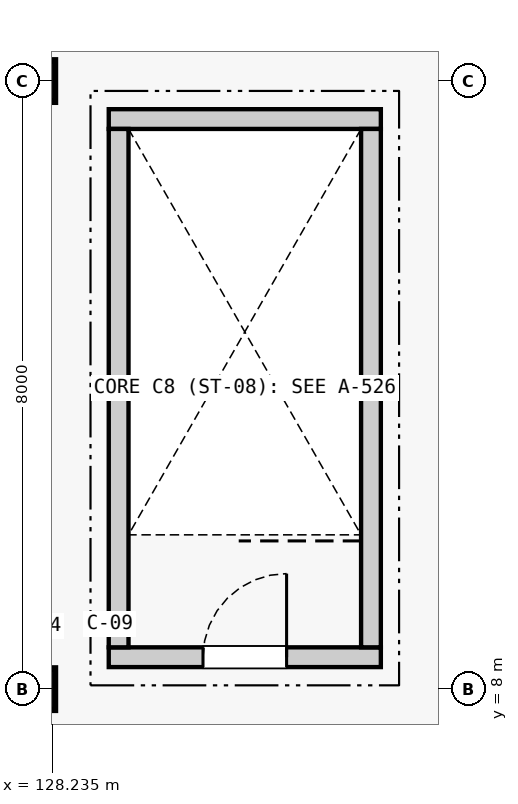
"""IFC4 building model, lengths in metres.
Left out: names, types, materials, properties, quantities, classifications, styles, units other than length and angle.
Written with IfcOpenShell. Run it as: python <this file> out.ifc"""

import sys

from ifc_helpers import new_model, si_unit, direction, frame, frame_2d, origin, origin_2d, place, context, subcontext, project, spatial, rectangle, extrude, element, fill, save


model = new_model("IFC4")
c1 = context("Model", 3, precision=1e-05, world=origin(), true_north=direction((0.0, 1.0)))
c2 = subcontext(c1, "Body", "Model", "MODEL_VIEW")
j1 = project(units=[si_unit("LENGTHUNIT", "METRE"), si_unit("PLANEANGLEUNIT", "RADIAN")], contexts=[c1])
p1 = place(None, origin())
s1 = spatial("IfcSite", under=j1, at=p1, CompositionType="ELEMENT")
p2 = place(p1, origin())
s2 = spatial("IfcBuilding", under=s1, at=p2, CompositionType="ELEMENT")
p3 = place(p2, frame((0.0, 0.0, 10.5)))
s3 = spatial("IfcBuildingStorey", under=s2, at=p3, CompositionType="ELEMENT", Elevation=10.5)
for number, where, z_axis, x_axis in (
    (1, (128.0, 8.0, 0.0), (0.0, 0.0, 1.0), (1.0, 0.0, 0.0)),
    (2, (128.0, 16.0, 0.0), (0.0, 0.0, 1.0), (1.0, 0.0, 0.0)),
):
    element("IfcColumn", number, at=place(p3, frame(where, z_axis=z_axis, x_axis=x_axis)), inside=s3, PredefinedType="COLUMN", context=c2, shape_type="SweptSolid", body=[
        extrude(rectangle(XDim=0.55, YDim=0.55, at=origin_2d()), origin(), (0.0, 0.0, 1.0), 4.8),
    ])
p4 = place(p3, frame((128.98, 8.42, 0.0), z_axis=(0.0, 0.0, 1.0), x_axis=(1.0, 0.0, 0.0)))
e3 = element("IfcWall", 3, at=p4, inside=s3, PredefinedType="SOLIDWALL", context=c2, shape_type="SweptSolid", body=[
    extrude(rectangle(XDim=3.58, YDim=0.26, at=frame_2d((1.79, 0.0))), origin(), (0.0, 0.0, 1.0), 4.8),
])
p5 = place(p4, frame((1.24, 0.0, 0.0)))
e4 = element("IfcOpeningElement", 4, at=p5, cuts=e3, PredefinedType="OPENING", context=c2, shape_type="SweptSolid", body=[
    extrude(rectangle(XDim=1.1, YDim=2.2, at=frame_2d((0.55, 1.1))), frame((0.0, 0.142, 0.0), z_axis=(0.0, -1.0, 0.0), x_axis=(1.0, 0.0, 0.0)), (0.0, 0.0, 1.0), 0.284),
])
p6 = place(p3, frame((128.98, 15.5, 0.0), z_axis=(0.0, 0.0, 1.0), x_axis=(1.0, 0.0, 0.0)))
e5 = element("IfcWall", 5, at=p6, inside=s3, PredefinedType="SOLIDWALL", context=c2, shape_type="SweptSolid", body=[
    extrude(rectangle(XDim=3.58, YDim=0.26, at=frame_2d((1.79, 0.0))), origin(), (0.0, 0.0, 1.0), 4.8),
])
for number, where, z_axis, x_axis in (
    (6, (129.11, 8.55, 0.0), (0.0, 0.0, 1.0), (0.0, 1.0, 0.0)),
    (7, (132.43, 8.55, 0.0), (0.0, 0.0, 1.0), (0.0, 1.0, 0.0)),
):
    element("IfcWall", number, at=place(p3, frame(where, z_axis=z_axis, x_axis=x_axis)), inside=s3, PredefinedType="SOLIDWALL", context=c2, shape_type="SweptSolid", body=[
        extrude(rectangle(XDim=6.82, YDim=0.26, at=frame_2d((3.41, 0.0))), origin(), (0.0, 0.0, 1.0), 4.8),
    ])
p7 = place(p5, origin())
e8 = element("IfcDoor", 8, at=p7, inside=s3, OperationType="SINGLE_SWING_RIGHT", PredefinedType="DOOR", context=c2, shape_type="SweptSolid", body=[
    extrude(rectangle(XDim=1.1, YDim=2.2, at=frame_2d((0.55, 1.1))), frame((0.0, 0.025, 0.0), z_axis=(0.0, -1.0, 0.0), x_axis=(1.0, 0.0, 0.0)), (0.0, 0.0, 1.0), 0.05),
])
fill(e4, e8)
save(model, sys.argv[1])
